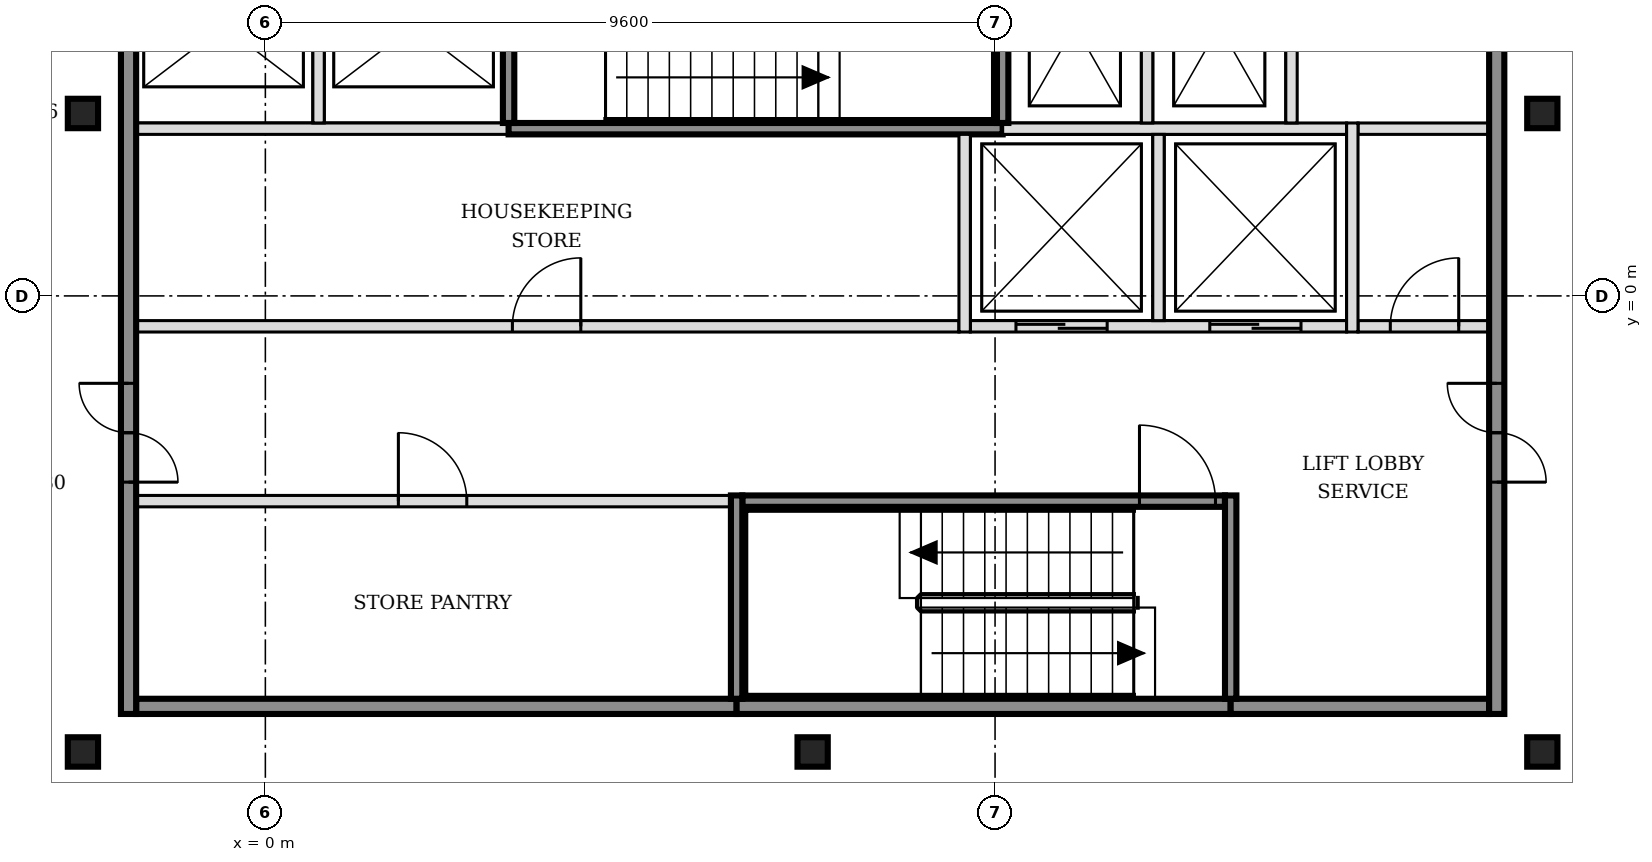
"""IFC4 building model, lengths in metres.
Left out: names, types, materials, properties, quantities, classifications, styles, units other than length and angle.
Written with IfcOpenShell. Run it as: python <this file> out.ifc"""

import sys

from ifc_helpers import new_model, si_unit, direction, frame, frame_2d, origin, origin_2d, place, context, subcontext, project, spatial, rectangle, i_section, extrude, element, fill, save


model = new_model("IFC4")
c1 = context("Model", 3, precision=1e-05, world=origin(), true_north=direction((0.0, 1.0)))
c2 = subcontext(c1, "Body", "Model", "MODEL_VIEW")
j1 = project(units=[si_unit("LENGTHUNIT", "METRE"), si_unit("PLANEANGLEUNIT", "RADIAN")], contexts=[c1])
p1 = place(None, origin())
s1 = spatial("IfcSite", under=j1, at=p1, CompositionType="ELEMENT")
p2 = place(p1, origin())
s2 = spatial("IfcBuilding", under=s1, at=p2, CompositionType="ELEMENT")
p3 = place(p2, frame((0.0, 0.0, 235.8)))
s3 = spatial("IfcBuildingStorey", under=s2, at=p3, CompositionType="ELEMENT", Elevation=235.8)
for number, where, z_axis, x_axis in (
    (1, (-2.4, -6.0, -0.15), (0.0, 0.0, 1.0), (1.0, 0.0, 0.0)),
    (2, (7.2, -6.0, -0.15), (0.0, 0.0, 1.0), (1.0, 0.0, 0.0)),
    (3, (16.8, -6.0, -0.15), (0.0, 0.0, 1.0), (1.0, 0.0, 0.0)),
    (4, (-2.4, 2.4, -0.15), (0.0, 0.0, 1.0), (1.0, 0.0, 0.0)),
    (5, (16.8, 2.4, -0.15), (0.0, 0.0, 1.0), (1.0, 0.0, 0.0)),
):
    element("IfcColumn", number, at=place(p3, frame(where, z_axis=z_axis, x_axis=x_axis)), inside=s3, PredefinedType="COLUMN", context=c2, shape_type="SweptSolid", body=[
        extrude(i_section(OverallWidth=0.398, OverallDepth=0.387, WebThickness=0.021, FlangeThickness=0.033, FilletRadius=0.015, at=origin_2d()), origin(), (0.0, 0.0, 1.0), 3.6),
    ])
p4 = place(p3, frame((-1.7, -5.4, 0.0), z_axis=(0.0, 0.0, 1.0), x_axis=(1.0, 0.0, 0.0)))
e6 = element("IfcWall", 6, at=p4, inside=s3, PredefinedType="SOLIDWALL", context=c2, shape_type="SweptSolid", body=[
    extrude(rectangle(XDim=7.9, YDim=0.2, at=frame_2d((3.95, 0.0))), origin(), (0.0, 0.0, 1.0), 3.45),
])
p5 = place(p3, frame((6.2, -5.4, 0.0), z_axis=(0.0, 0.0, 1.0), x_axis=(1.0, 0.0, 0.0)))
e7 = element("IfcWall", 7, at=p5, inside=s3, PredefinedType="SOLIDWALL", context=c2, shape_type="SweptSolid", body=[
    extrude(rectangle(XDim=6.5, YDim=0.2, at=frame_2d((3.25, 0.0))), origin(), (0.0, 0.0, 1.0), 3.45),
])
p6 = place(p3, frame((12.7, -5.4, 0.0), z_axis=(0.0, 0.0, 1.0), x_axis=(1.0, 0.0, 0.0)))
e8 = element("IfcWall", 8, at=p6, inside=s3, PredefinedType="SOLIDWALL", context=c2, shape_type="SweptSolid", body=[
    extrude(rectangle(XDim=3.4, YDim=0.2, at=frame_2d((1.7, 0.0))), origin(), (0.0, 0.0, 1.0), 3.45),
])
p7 = place(p3, frame((-1.7, -2.7, 0.0), z_axis=(0.0, 0.0, 1.0), x_axis=(1.0, 0.0, 0.0)))
e9 = element("IfcWall", 9, at=p7, inside=s3, PredefinedType="PARTITIONING", context=c2, shape_type="SweptSolid", body=[
    extrude(rectangle(XDim=7.825, YDim=0.15, at=frame_2d((3.913, 0.0))), origin(), (0.0, 0.0, 1.0), 3.45),
])
p8 = place(p7, frame((3.45, 0.0, 0.0)))
e10 = element("IfcOpeningElement", 10, at=p8, cuts=e9, PredefinedType="OPENING", context=c2, shape_type="SweptSolid", body=[
    extrude(rectangle(XDim=0.9, YDim=2.1, at=frame_2d((0.45, 1.05))), frame((0.0, 0.085, 0.0), z_axis=(0.0, -1.0, 0.0), x_axis=(1.0, 0.0, 0.0)), (0.0, 0.0, 1.0), 0.17),
])
p9 = place(p3, frame((6.275, -2.7, 0.0), z_axis=(0.0, 0.0, 1.0), x_axis=(1.0, 0.0, 0.0)))
e11 = element("IfcWall", 11, at=p9, inside=s3, PredefinedType="SOLIDWALL", context=c2, shape_type="SweptSolid", body=[
    extrude(rectangle(XDim=6.35, YDim=0.15, at=frame_2d((3.175, 0.0))), origin(), (0.0, 0.0, 1.0), 3.45),
])
p10 = place(p9, frame((5.225, 0.0, 0.0)))
e12 = element("IfcOpeningElement", 12, at=p10, cuts=e11, PredefinedType="OPENING", context=c2, shape_type="SweptSolid", body=[
    extrude(rectangle(XDim=1.0, YDim=2.1, at=frame_2d((0.5, 1.05))), frame((0.0, 0.085, 0.0), z_axis=(0.0, -1.0, 0.0), x_axis=(1.0, 0.0, 0.0)), (0.0, 0.0, 1.0), 0.17),
])
p11 = place(p3, frame((-1.7, -0.4, 0.0), z_axis=(0.0, 0.0, 1.0), x_axis=(1.0, 0.0, 0.0)))
e13 = element("IfcWall", 13, at=p11, inside=s3, PredefinedType="PARTITIONING", context=c2, shape_type="SweptSolid", body=[
    extrude(rectangle(XDim=10.825, YDim=0.15, at=frame_2d((5.413, 0.0))), origin(), (0.0, 0.0, 1.0), 3.45),
])
p12 = place(p11, frame((4.95, 0.0, 0.0)))
e14 = element("IfcOpeningElement", 14, at=p12, cuts=e13, PredefinedType="OPENING", context=c2, shape_type="SweptSolid", body=[
    extrude(rectangle(XDim=0.9, YDim=2.1, at=frame_2d((0.45, 1.05))), frame((0.0, 0.085, 0.0), z_axis=(0.0, -1.0, 0.0), x_axis=(1.0, 0.0, 0.0)), (0.0, 0.0, 1.0), 0.17),
])
p13 = place(p3, frame((9.275, -0.4, 0.0), z_axis=(0.0, 0.0, 1.0), x_axis=(1.0, 0.0, 0.0)))
e15 = element("IfcWall", 15, at=p13, inside=s3, PredefinedType="SOLIDWALL", context=c2, shape_type="SweptSolid", body=[
    extrude(rectangle(XDim=4.95, YDim=0.15, at=frame_2d((2.475, 0.0))), origin(), (0.0, 0.0, 1.0), 3.45),
])
p14 = place(p13, frame((0.6, 0.0, 0.0)))
e16 = element("IfcOpeningElement", 16, at=p14, cuts=e15, PredefinedType="OPENING", context=c2, shape_type="SweptSolid", body=[
    extrude(rectangle(XDim=1.2, YDim=2.1, at=frame_2d((0.6, 1.05))), frame((0.0, 0.085, 0.0), z_axis=(0.0, -1.0, 0.0), x_axis=(1.0, 0.0, 0.0)), (0.0, 0.0, 1.0), 0.17),
])
p15 = place(p13, frame((3.15, 0.0, 0.0)))
e17 = element("IfcOpeningElement", 17, at=p15, cuts=e15, PredefinedType="OPENING", context=c2, shape_type="SweptSolid", body=[
    extrude(rectangle(XDim=1.2, YDim=2.1, at=frame_2d((0.6, 1.05))), frame((0.0, 0.085, 0.0), z_axis=(0.0, -1.0, 0.0), x_axis=(1.0, 0.0, 0.0)), (0.0, 0.0, 1.0), 0.17),
])
p16 = place(p3, frame((14.375, -0.4, 0.0), z_axis=(0.0, 0.0, 1.0), x_axis=(1.0, 0.0, 0.0)))
e18 = element("IfcWall", 18, at=p16, inside=s3, PredefinedType="PARTITIONING", context=c2, shape_type="SweptSolid", body=[
    extrude(rectangle(XDim=1.725, YDim=0.15, at=frame_2d((0.863, 0.0))), origin(), (0.0, 0.0, 1.0), 3.45),
])
p17 = place(p16, frame((0.425, 0.0, 0.0)))
e19 = element("IfcOpeningElement", 19, at=p17, cuts=e18, PredefinedType="OPENING", context=c2, shape_type="SweptSolid", body=[
    extrude(rectangle(XDim=0.9, YDim=2.1, at=frame_2d((0.45, 1.05))), frame((0.0, 0.085, 0.0), z_axis=(0.0, -1.0, 0.0), x_axis=(1.0, 0.0, 0.0)), (0.0, 0.0, 1.0), 0.17),
])
p18 = place(p3, frame((-1.7, 2.2, 0.0), z_axis=(0.0, 0.0, 1.0), x_axis=(1.0, 0.0, 0.0)))
e20 = element("IfcWall", 20, at=p18, inside=s3, PredefinedType="SOLIDWALL", context=c2, shape_type="SweptSolid", body=[
    extrude(rectangle(XDim=4.9, YDim=0.15, at=frame_2d((2.45, 0.0))), origin(), (0.0, 0.0, 1.0), 3.45),
])
p19 = place(p3, frame((3.2, 2.2, 0.0), z_axis=(0.0, 0.0, 1.0), x_axis=(1.0, 0.0, 0.0)))
e21 = element("IfcWall", 21, at=p19, inside=s3, PredefinedType="SOLIDWALL", context=c2, shape_type="SweptSolid", body=[
    extrude(rectangle(XDim=6.5, YDim=0.15, at=frame_2d((3.25, 0.0))), origin(), (0.0, 0.0, 1.0), 3.45),
])
p20 = place(p3, frame((9.7, 2.2, 0.0), z_axis=(0.0, 0.0, 1.0), x_axis=(1.0, 0.0, 0.0)))
e22 = element("IfcWall", 22, at=p20, inside=s3, PredefinedType="SOLIDWALL", context=c2, shape_type="SweptSolid", body=[
    extrude(rectangle(XDim=4.525, YDim=0.15, at=frame_2d((2.263, 0.0))), origin(), (0.0, 0.0, 1.0), 3.45),
])
p21 = place(p3, frame((14.375, 2.2, 0.0), z_axis=(0.0, 0.0, 1.0), x_axis=(1.0, 0.0, 0.0)))
e23 = element("IfcWall", 23, at=p21, inside=s3, PredefinedType="PARTITIONING", context=c2, shape_type="SweptSolid", body=[
    extrude(rectangle(XDim=1.725, YDim=0.15, at=frame_2d((0.863, 0.0))), origin(), (0.0, 0.0, 1.0), 3.45),
])
p22 = place(p3, frame((-1.8, -5.5, 0.0), z_axis=(0.0, 0.0, 1.0), x_axis=(0.0, 1.0, 0.0)))
e24 = element("IfcWall", 24, at=p22, inside=s3, PredefinedType="SOLIDWALL", context=c2, shape_type="SweptSolid", body=[
    extrude(rectangle(XDim=15.8, YDim=0.2, at=frame_2d((7.9, 0.0))), origin(), (0.0, 0.0, 1.0), 3.45),
])
p23 = place(p22, frame((3.05, 0.0, 0.0)))
e25 = element("IfcOpeningElement", 25, at=p23, cuts=e24, PredefinedType="OPENING", context=c2, shape_type="SweptSolid", body=[
    extrude(rectangle(XDim=1.3, YDim=2.1, at=frame_2d((0.65, 1.05))), frame((0.0, 0.11, 0.0), z_axis=(0.0, -1.0, 0.0), x_axis=(1.0, 0.0, 0.0)), (0.0, 0.0, 1.0), 0.22),
])
p24 = place(p22, frame((11.45, 0.0, 0.0)))
e26 = element("IfcOpeningElement", 26, at=p24, cuts=e24, PredefinedType="OPENING", context=c2, shape_type="SweptSolid", body=[
    extrude(rectangle(XDim=1.3, YDim=2.1, at=frame_2d((0.65, 1.05))), frame((0.0, 0.11, 0.0), z_axis=(0.0, -1.0, 0.0), x_axis=(1.0, 0.0, 0.0)), (0.0, 0.0, 1.0), 0.22),
])
for number, where, z_axis, x_axis in (
    (27, (0.7, 2.275, 0.0), (0.0, 0.0, 1.0), (0.0, 1.0, 0.0)),
    (28, (3.2, 2.275, 0.0), (0.0, 0.0, 1.0), (0.0, 1.0, 0.0)),
):
    element("IfcWall", number, at=place(p3, frame(where, z_axis=z_axis, x_axis=x_axis)), inside=s3, PredefinedType="SOLIDWALL", context=c2, shape_type="SweptSolid", body=[
        extrude(rectangle(XDim=2.55, YDim=0.15, at=frame_2d((1.275, 0.0))), origin(), (0.0, 0.0, 1.0), 3.45),
    ])
p25 = place(p3, frame((6.2, -5.3, 0.0), z_axis=(0.0, 0.0, 1.0), x_axis=(0.0, 1.0, 0.0)))
e29 = element("IfcWall", 29, at=p25, inside=s3, PredefinedType="SOLIDWALL", context=c2, shape_type="SweptSolid", body=[
    extrude(rectangle(XDim=2.675, YDim=0.15, at=frame_2d((1.337, 0.0))), origin(), (0.0, 0.0, 1.0), 3.45),
])
p26 = place(p3, frame((9.2, -0.475, 0.0), z_axis=(0.0, 0.0, 1.0), x_axis=(0.0, 1.0, 0.0)))
e30 = element("IfcWall", 30, at=p26, inside=s3, PredefinedType="SOLIDWALL", context=c2, shape_type="SweptSolid", body=[
    extrude(rectangle(XDim=2.6, YDim=0.15, at=frame_2d((1.3, 0.0))), origin(), (0.0, 0.0, 1.0), 3.45),
])
for number, where, z_axis, x_axis in (
    (31, (9.7, 2.275, 0.0), (0.0, 0.0, 1.0), (0.0, 1.0, 0.0)),
    (32, (11.6, 2.275, 0.0), (0.0, 0.0, 1.0), (0.0, 1.0, 0.0)),
):
    element("IfcWall", number, at=place(p3, frame(where, z_axis=z_axis, x_axis=x_axis)), inside=s3, PredefinedType="SOLIDWALL", context=c2, shape_type="SweptSolid", body=[
        extrude(rectangle(XDim=2.55, YDim=0.15, at=frame_2d((1.275, 0.0))), origin(), (0.0, 0.0, 1.0), 3.45),
    ])
p27 = place(p3, frame((11.75, -0.325, 0.0), z_axis=(0.0, 0.0, 1.0), x_axis=(0.0, 1.0, 0.0)))
e33 = element("IfcWall", 33, at=p27, inside=s3, PredefinedType="SOLIDWALL", context=c2, shape_type="SweptSolid", body=[
    extrude(rectangle(XDim=2.45, YDim=0.15, at=frame_2d((1.225, 0.0))), origin(), (0.0, 0.0, 1.0), 3.45),
])
p28 = place(p3, frame((12.7, -5.3, 0.0), z_axis=(0.0, 0.0, 1.0), x_axis=(0.0, 1.0, 0.0)))
e34 = element("IfcWall", 34, at=p28, inside=s3, PredefinedType="SOLIDWALL", context=c2, shape_type="SweptSolid", body=[
    extrude(rectangle(XDim=2.675, YDim=0.15, at=frame_2d((1.337, 0.0))), origin(), (0.0, 0.0, 1.0), 3.45),
])
p29 = place(p3, frame((13.5, 2.275, 0.0), z_axis=(0.0, 0.0, 1.0), x_axis=(0.0, 1.0, 0.0)))
e35 = element("IfcWall", 35, at=p29, inside=s3, PredefinedType="SOLIDWALL", context=c2, shape_type="SweptSolid", body=[
    extrude(rectangle(XDim=2.55, YDim=0.15, at=frame_2d((1.275, 0.0))), origin(), (0.0, 0.0, 1.0), 3.45),
])
p30 = place(p3, frame((14.3, -0.475, 0.0), z_axis=(0.0, 0.0, 1.0), x_axis=(0.0, 1.0, 0.0)))
e36 = element("IfcWall", 36, at=p30, inside=s3, PredefinedType="SOLIDWALL", context=c2, shape_type="SweptSolid", body=[
    extrude(rectangle(XDim=2.75, YDim=0.15, at=frame_2d((1.375, 0.0))), origin(), (0.0, 0.0, 1.0), 3.45),
])
p31 = place(p3, frame((16.2, -5.5, 0.0), z_axis=(0.0, 0.0, 1.0), x_axis=(0.0, 1.0, 0.0)))
e37 = element("IfcWall", 37, at=p31, inside=s3, PredefinedType="SOLIDWALL", context=c2, shape_type="SweptSolid", body=[
    extrude(rectangle(XDim=15.8, YDim=0.2, at=frame_2d((7.9, 0.0))), origin(), (0.0, 0.0, 1.0), 3.45),
])
p32 = place(p31, frame((3.05, 0.0, 0.0)))
e38 = element("IfcOpeningElement", 38, at=p32, cuts=e37, PredefinedType="OPENING", context=c2, shape_type="SweptSolid", body=[
    extrude(rectangle(XDim=1.3, YDim=2.1, at=frame_2d((0.65, 1.05))), frame((0.0, 0.11, 0.0), z_axis=(0.0, -1.0, 0.0), x_axis=(1.0, 0.0, 0.0)), (0.0, 0.0, 1.0), 0.22),
])
p33 = place(p31, frame((11.45, 0.0, 0.0)))
e39 = element("IfcOpeningElement", 39, at=p33, cuts=e37, PredefinedType="OPENING", context=c2, shape_type="SweptSolid", body=[
    extrude(rectangle(XDim=1.3, YDim=2.1, at=frame_2d((0.65, 1.05))), frame((0.0, 0.11, 0.0), z_axis=(0.0, -1.0, 0.0), x_axis=(1.0, 0.0, 0.0)), (0.0, 0.0, 1.0), 0.22),
])
p34 = place(p14, origin())
e40 = element("IfcDoor", 40, at=p34, inside=s3, OperationType="DOUBLE_DOOR_SLIDING", PredefinedType="DOOR", context=c2, shape_type="SweptSolid", body=[
    extrude(rectangle(XDim=1.2, YDim=2.1, at=frame_2d((0.6, 1.05))), frame((0.0, 0.025, 0.0), z_axis=(0.0, -1.0, 0.0), x_axis=(1.0, 0.0, 0.0)), (0.0, 0.0, 1.0), 0.05),
])
fill(e16, e40)
p35 = place(p15, origin())
e41 = element("IfcDoor", 41, at=p35, inside=s3, OperationType="DOUBLE_DOOR_SLIDING", PredefinedType="DOOR", context=c2, shape_type="SweptSolid", body=[
    extrude(rectangle(XDim=1.2, YDim=2.1, at=frame_2d((0.6, 1.05))), frame((0.0, 0.025, 0.0), z_axis=(0.0, -1.0, 0.0), x_axis=(1.0, 0.0, 0.0)), (0.0, 0.0, 1.0), 0.05),
])
fill(e17, e41)
p36 = place(p10, origin())
e42 = element("IfcDoor", 42, at=p36, inside=s3, OperationType="SINGLE_SWING_LEFT", PredefinedType="DOOR", context=c2, shape_type="SweptSolid", body=[
    extrude(rectangle(XDim=1.0, YDim=2.1, at=frame_2d((0.5, 1.05))), frame((0.0, 0.025, 0.0), z_axis=(0.0, -1.0, 0.0), x_axis=(1.0, 0.0, 0.0)), (0.0, 0.0, 1.0), 0.05),
])
fill(e12, e42)
p37 = place(p23, origin())
e43 = element("IfcDoor", 43, at=p37, inside=s3, OperationType="DOUBLE_DOOR_SINGLE_SWING", PredefinedType="DOOR", context=c2, shape_type="SweptSolid", body=[
    extrude(rectangle(XDim=1.3, YDim=2.1, at=frame_2d((0.65, 1.05))), frame((0.0, 0.025, 0.0), z_axis=(0.0, -1.0, 0.0), x_axis=(1.0, 0.0, 0.0)), (0.0, 0.0, 1.0), 0.05),
])
fill(e25, e43)
p38 = place(p32, origin())
e44 = element("IfcDoor", 44, at=p38, inside=s3, OperationType="DOUBLE_DOOR_SINGLE_SWING", PredefinedType="DOOR", context=c2, shape_type="SweptSolid", body=[
    extrude(rectangle(XDim=1.3, YDim=2.1, at=frame_2d((0.65, 1.05))), frame((0.0, 0.025, 0.0), z_axis=(0.0, -1.0, 0.0), x_axis=(1.0, 0.0, 0.0)), (0.0, 0.0, 1.0), 0.05),
])
fill(e38, e44)
p39 = place(p17, origin())
e45 = element("IfcDoor", 45, at=p39, inside=s3, OperationType="SINGLE_SWING_RIGHT", PredefinedType="DOOR", context=c2, shape_type="SweptSolid", body=[
    extrude(rectangle(XDim=0.9, YDim=2.1, at=frame_2d((0.45, 1.05))), frame((0.0, 0.025, 0.0), z_axis=(0.0, -1.0, 0.0), x_axis=(1.0, 0.0, 0.0)), (0.0, 0.0, 1.0), 0.05),
])
fill(e19, e45)
p40 = place(p8, origin())
e46 = element("IfcDoor", 46, at=p40, inside=s3, OperationType="SINGLE_SWING_LEFT", PredefinedType="DOOR", context=c2, shape_type="SweptSolid", body=[
    extrude(rectangle(XDim=0.9, YDim=2.1, at=frame_2d((0.45, 1.05))), frame((0.0, 0.025, 0.0), z_axis=(0.0, -1.0, 0.0), x_axis=(1.0, 0.0, 0.0)), (0.0, 0.0, 1.0), 0.05),
])
fill(e10, e46)
p41 = place(p12, origin())
e47 = element("IfcDoor", 47, at=p41, inside=s3, OperationType="SINGLE_SWING_RIGHT", PredefinedType="DOOR", context=c2, shape_type="SweptSolid", body=[
    extrude(rectangle(XDim=0.9, YDim=2.1, at=frame_2d((0.45, 1.05))), frame((0.0, 0.025, 0.0), z_axis=(0.0, -1.0, 0.0), x_axis=(1.0, 0.0, 0.0)), (0.0, 0.0, 1.0), 0.05),
])
fill(e14, e47)
save(model, sys.argv[1])
